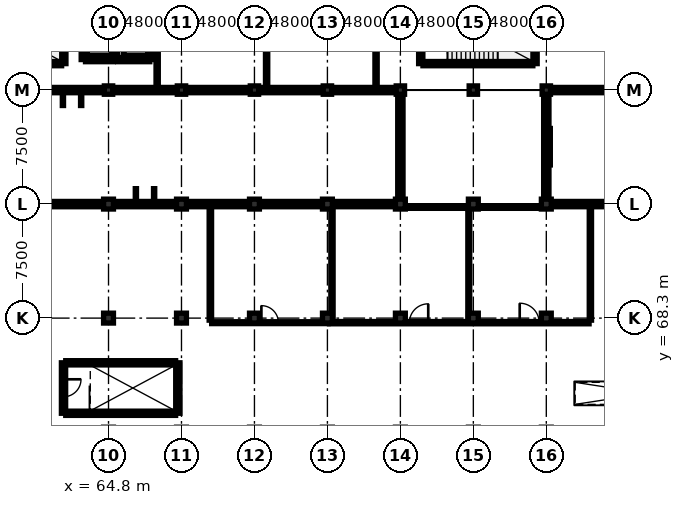
"""IFC4 building model, lengths in metres.
Left out: names, types, materials, properties, quantities, classifications, styles, units other than length and angle.
Written with IfcOpenShell. Run it as: python <this file> out.ifc"""

import sys

from ifc_helpers import new_model, si_unit, direction, frame, frame_2d, origin, origin_2d, place, context, subcontext, project, spatial, rectangle, circle, extrude, element, fill, save


model = new_model("IFC4")
c1 = context("Model", 3, precision=1e-05, world=origin(), true_north=direction((0.0, 1.0)))
c2 = subcontext(c1, "Body", "Model", "MODEL_VIEW")
j1 = project(units=[si_unit("LENGTHUNIT", "METRE"), si_unit("PLANEANGLEUNIT", "RADIAN")], contexts=[c1])
p1 = place(None, origin())
s1 = spatial("IfcSite", under=j1, at=p1, CompositionType="ELEMENT")
p2 = place(p1, origin())
s2 = spatial("IfcBuilding", under=s1, at=p2, CompositionType="ELEMENT")
p3 = place(p2, frame((0.0, 0.0, 9.5)))
s3 = spatial("IfcBuildingStorey", under=s2, at=p3, CompositionType="ELEMENT", Elevation=9.5)
for number, where, z_axis, x_axis in (
    (1, (64.8, 83.3, 0.0), (0.0, 0.0, 1.0), (1.0, 0.0, 0.0)),
    (2, (69.6, 83.3, 0.0), (0.0, 0.0, 1.0), (1.0, 0.0, 0.0)),
    (3, (74.4, 83.3, 0.0), (0.0, 0.0, 1.0), (1.0, 0.0, 0.0)),
    (4, (79.2, 83.3, 0.0), (0.0, 0.0, 1.0), (1.0, 0.0, 0.0)),
):
    element("IfcColumn", number, at=place(p3, frame(where, z_axis=z_axis, x_axis=x_axis)), inside=s3, PredefinedType="COLUMN", context=c2, shape_type="SweptSolid", body=[
        extrude(rectangle(XDim=0.55, YDim=0.55, at=origin_2d()), origin(), (0.0, 0.0, 1.0), 3.7),
    ])
p4 = place(p3, frame((84.0, 75.8, 0.0), z_axis=(0.0, 0.0, 1.0), x_axis=(1.0, 0.0, 0.0)))
e5 = element("IfcColumn", 5, at=p4, inside=s3, PredefinedType="COLUMN", context=c2, shape_type="SweptSolid", body=[
    extrude(circle(Radius=0.325, at=origin_2d()), origin(), (0.0, 0.0, 1.0), 8.55),
])
p5 = place(p3, frame((84.0, 83.3, 0.0), z_axis=(0.0, 0.0, 1.0), x_axis=(1.0, 0.0, 0.0)))
e6 = element("IfcColumn", 6, at=p5, inside=s3, PredefinedType="COLUMN", context=c2, shape_type="SweptSolid", body=[
    extrude(rectangle(XDim=0.55, YDim=0.55, at=origin_2d()), origin(), (0.0, 0.0, 1.0), 3.8),
])
p6 = place(p3, frame((88.8, 75.8, 0.0), z_axis=(0.0, 0.0, 1.0), x_axis=(1.0, 0.0, 0.0)))
e7 = element("IfcColumn", 7, at=p6, inside=s3, PredefinedType="COLUMN", context=c2, shape_type="SweptSolid", body=[
    extrude(circle(Radius=0.325, at=origin_2d()), origin(), (0.0, 0.0, 1.0), 8.55),
])
p7 = place(p3, frame((88.8, 83.3, 0.0), z_axis=(0.0, 0.0, 1.0), x_axis=(1.0, 0.0, 0.0)))
e8 = element("IfcColumn", 8, at=p7, inside=s3, PredefinedType="COLUMN", context=c2, shape_type="SweptSolid", body=[
    extrude(rectangle(XDim=0.55, YDim=0.55, at=origin_2d()), origin(), (0.0, 0.0, 1.0), 3.7),
])
p8 = place(p3, frame((93.6, 75.8, 0.0), z_axis=(0.0, 0.0, 1.0), x_axis=(1.0, 0.0, 0.0)))
e9 = element("IfcColumn", 9, at=p8, inside=s3, PredefinedType="COLUMN", context=c2, shape_type="SweptSolid", body=[
    extrude(circle(Radius=0.325, at=origin_2d()), origin(), (0.0, 0.0, 1.0), 8.55),
])
p9 = place(p3, frame((93.6, 83.3, 0.0), z_axis=(0.0, 0.0, 1.0), x_axis=(1.0, 0.0, 0.0)))
e10 = element("IfcColumn", 10, at=p9, inside=s3, PredefinedType="COLUMN", context=c2, shape_type="SweptSolid", body=[
    extrude(rectangle(XDim=0.55, YDim=0.55, at=origin_2d()), origin(), (0.0, 0.0, 1.0), 3.8),
])
p10 = place(p3, frame((64.8, 68.3, 0.0), z_axis=(0.0, 0.0, 1.0), x_axis=(1.0, 0.0, 0.0)))
e11 = element("IfcColumn", 11, at=p10, inside=s3, PredefinedType="COLUMN", context=c2, shape_type="SweptSolid", body=[
    extrude(circle(Radius=0.325, at=origin_2d()), origin(), (0.0, 0.0, 1.0), 6.0),
])
p11 = place(p3, frame((64.8, 75.8, 0.0), z_axis=(0.0, 0.0, 1.0), x_axis=(1.0, 0.0, 0.0)))
e12 = element("IfcColumn", 12, at=p11, inside=s3, PredefinedType="COLUMN", context=c2, shape_type="SweptSolid", body=[
    extrude(circle(Radius=0.325, at=origin_2d()), origin(), (0.0, 0.0, 1.0), 8.55),
])
p12 = place(p3, frame((69.6, 68.3, 0.0), z_axis=(0.0, 0.0, 1.0), x_axis=(1.0, 0.0, 0.0)))
e13 = element("IfcColumn", 13, at=p12, inside=s3, PredefinedType="COLUMN", context=c2, shape_type="SweptSolid", body=[
    extrude(circle(Radius=0.325, at=origin_2d()), origin(), (0.0, 0.0, 1.0), 6.0),
])
p13 = place(p3, frame((69.6, 75.8, 0.0), z_axis=(0.0, 0.0, 1.0), x_axis=(1.0, 0.0, 0.0)))
e14 = element("IfcColumn", 14, at=p13, inside=s3, PredefinedType="COLUMN", context=c2, shape_type="SweptSolid", body=[
    extrude(circle(Radius=0.325, at=origin_2d()), origin(), (0.0, 0.0, 1.0), 8.55),
])
p14 = place(p3, frame((74.4, 68.3, 0.0), z_axis=(0.0, 0.0, 1.0), x_axis=(1.0, 0.0, 0.0)))
e15 = element("IfcColumn", 15, at=p14, inside=s3, PredefinedType="COLUMN", context=c2, shape_type="SweptSolid", body=[
    extrude(circle(Radius=0.325, at=origin_2d()), origin(), (0.0, 0.0, 1.0), 6.0),
])
p15 = place(p3, frame((74.4, 75.8, 0.0), z_axis=(0.0, 0.0, 1.0), x_axis=(1.0, 0.0, 0.0)))
e16 = element("IfcColumn", 16, at=p15, inside=s3, PredefinedType="COLUMN", context=c2, shape_type="SweptSolid", body=[
    extrude(circle(Radius=0.325, at=origin_2d()), origin(), (0.0, 0.0, 1.0), 8.55),
])
p16 = place(p3, frame((79.2, 68.3, 0.0), z_axis=(0.0, 0.0, 1.0), x_axis=(1.0, 0.0, 0.0)))
e17 = element("IfcColumn", 17, at=p16, inside=s3, PredefinedType="COLUMN", context=c2, shape_type="SweptSolid", body=[
    extrude(circle(Radius=0.325, at=origin_2d()), origin(), (0.0, 0.0, 1.0), 6.0),
])
p17 = place(p3, frame((79.2, 75.8, 0.0), z_axis=(0.0, 0.0, 1.0), x_axis=(1.0, 0.0, 0.0)))
e18 = element("IfcColumn", 18, at=p17, inside=s3, PredefinedType="COLUMN", context=c2, shape_type="SweptSolid", body=[
    extrude(circle(Radius=0.325, at=origin_2d()), origin(), (0.0, 0.0, 1.0), 8.55),
])
for number, where, z_axis, x_axis in (
    (19, (84.0, 68.3, 0.0), (0.0, 0.0, 1.0), (1.0, 0.0, 0.0)),
    (20, (88.8, 68.3, 0.0), (0.0, 0.0, 1.0), (1.0, 0.0, 0.0)),
    (21, (93.6, 68.3, 0.0), (0.0, 0.0, 1.0), (1.0, 0.0, 0.0)),
):
    element("IfcColumn", number, at=place(p3, frame(where, z_axis=z_axis, x_axis=x_axis)), inside=s3, PredefinedType="COLUMN", context=c2, shape_type="SweptSolid", body=[
        extrude(circle(Radius=0.325, at=origin_2d()), origin(), (0.0, 0.0, 1.0), 6.0),
    ])
for number, where, z_axis, x_axis in (
    (22, (83.725, 83.3, 0.0), (0.0, 0.0, 1.0), (-1.0, 0.0, 0.0)),
    (23, (78.925, 83.3, 0.0), (0.0, 0.0, 1.0), (-1.0, 0.0, 0.0)),
    (24, (74.125, 83.3, 0.0), (0.0, 0.0, 1.0), (-1.0, 0.0, 0.0)),
    (25, (69.325, 83.3, 0.0), (0.0, 0.0, 1.0), (-1.0, 0.0, 0.0)),
):
    element("IfcWall", number, at=place(p3, frame(where, z_axis=z_axis, x_axis=x_axis)), inside=s3, PredefinedType="SOLIDWALL", context=c2, shape_type="SweptSolid", body=[
        extrude(rectangle(XDim=4.25, YDim=0.35, at=frame_2d((2.125, 0.0))), origin(), (0.0, 0.0, 1.0), 2.985),
    ])
for number, where, z_axis, x_axis in (
    (26, (64.525, 83.3, 0.0), (0.0, 0.0, 1.0), (-1.0, 0.0, 0.0)),
    (27, (98.125, 83.3, 0.0), (0.0, 0.0, 1.0), (-1.0, 0.0, 0.0)),
):
    element("IfcWall", number, at=place(p3, frame(where, z_axis=z_axis, x_axis=x_axis)), inside=s3, PredefinedType="SOLIDWALL", context=c2, shape_type="SweptSolid", body=[
        extrude(rectangle(XDim=4.25, YDim=0.35, at=frame_2d((2.125, 0.0))), origin(), (0.0, 0.0, 1.0), 3.035),
    ])
p18 = place(p3, frame((93.6, 83.025, 0.0), z_axis=(0.0, 0.0, 1.0), x_axis=(0.0, -1.0, 0.0)))
e28 = element("IfcWall", 28, at=p18, inside=s3, PredefinedType="SOLIDWALL", context=c2, shape_type="SweptSolid", body=[
    extrude(rectangle(XDim=6.9, YDim=0.35, at=frame_2d((3.45, 0.0))), origin(), (0.0, 0.0, 1.0), 3.035),
])
p19 = place(p3, frame((93.925, 75.8, 0.0), z_axis=(0.0, 0.0, 1.0), x_axis=(1.0, 0.0, 0.0)))
e29 = element("IfcWall", 29, at=p19, inside=s3, PredefinedType="SOLIDWALL", context=c2, shape_type="SweptSolid", body=[
    extrude(rectangle(XDim=4.15, YDim=0.35, at=frame_2d((2.075, 0.0))), origin(), (0.0, 0.0, 1.0), 3.425),
])
p20 = place(p3, frame((60.325, 75.8, 0.0), z_axis=(0.0, 0.0, 1.0), x_axis=(1.0, 0.0, 0.0)))
e30 = element("IfcWall", 30, at=p20, inside=s3, PredefinedType="SOLIDWALL", context=c2, shape_type="SweptSolid", body=[
    extrude(rectangle(XDim=4.15, YDim=0.35, at=frame_2d((2.075, 0.0))), origin(), (0.0, 0.0, 1.0), 3.7),
])
p21 = place(p20, frame((1.375, 0.0, 0.9)))
e31 = element("IfcOpeningElement", 31, at=p21, cuts=e30, PredefinedType="OPENING", context=c2, shape_type="SweptSolid", body=[
    extrude(rectangle(XDim=1.4, YDim=1.3, at=frame_2d((0.7, 0.65))), frame((0.0, 0.187, 0.0), z_axis=(0.0, -1.0, 0.0), x_axis=(1.0, 0.0, 0.0)), (0.0, 0.0, 1.0), 0.374),
])
p22 = place(p3, frame((65.125, 75.8, 0.0), z_axis=(0.0, 0.0, 1.0), x_axis=(1.0, 0.0, 0.0)))
e32 = element("IfcWall", 32, at=p22, inside=s3, PredefinedType="SOLIDWALL", context=c2, shape_type="SweptSolid", body=[
    extrude(rectangle(XDim=4.15, YDim=0.35, at=frame_2d((2.075, 0.0))), origin(), (0.0, 0.0, 1.0), 3.7),
])
p23 = place(p22, frame((1.375, 0.0, 0.9)))
e33 = element("IfcOpeningElement", 33, at=p23, cuts=e32, PredefinedType="OPENING", context=c2, shape_type="SweptSolid", body=[
    extrude(rectangle(XDim=1.4, YDim=1.5, at=frame_2d((0.7, 0.75))), frame((0.0, 0.187, 0.0), z_axis=(0.0, -1.0, 0.0), x_axis=(1.0, 0.0, 0.0)), (0.0, 0.0, 1.0), 0.374),
])
p24 = place(p3, frame((69.925, 75.8, 0.0), z_axis=(0.0, 0.0, 1.0), x_axis=(1.0, 0.0, 0.0)))
e34 = element("IfcWall", 34, at=p24, inside=s3, PredefinedType="SOLIDWALL", context=c2, shape_type="SweptSolid", body=[
    extrude(rectangle(XDim=4.15, YDim=0.35, at=frame_2d((2.075, 0.0))), origin(), (0.0, 0.0, 1.0), 3.7),
])
p25 = place(p3, frame((74.725, 75.8, 0.0), z_axis=(0.0, 0.0, 1.0), x_axis=(1.0, 0.0, 0.0)))
e35 = element("IfcWall", 35, at=p25, inside=s3, PredefinedType="SOLIDWALL", context=c2, shape_type="SweptSolid", body=[
    extrude(rectangle(XDim=4.15, YDim=0.35, at=frame_2d((2.075, 0.0))), origin(), (0.0, 0.0, 1.0), 3.7),
])
p26 = place(p25, frame((1.375, 0.0, 0.9)))
e36 = element("IfcOpeningElement", 36, at=p26, cuts=e35, PredefinedType="OPENING", context=c2, shape_type="SweptSolid", body=[
    extrude(rectangle(XDim=1.4, YDim=1.7, at=frame_2d((0.7, 0.85))), frame((0.0, 0.187, 0.0), z_axis=(0.0, -1.0, 0.0), x_axis=(1.0, 0.0, 0.0)), (0.0, 0.0, 1.0), 0.374),
])
p27 = place(p3, frame((79.525, 75.8, 0.0), z_axis=(0.0, 0.0, 1.0), x_axis=(1.0, 0.0, 0.0)))
e37 = element("IfcWall", 37, at=p27, inside=s3, PredefinedType="SOLIDWALL", context=c2, shape_type="SweptSolid", body=[
    extrude(rectangle(XDim=4.15, YDim=0.35, at=frame_2d((2.075, 0.0))), origin(), (0.0, 0.0, 1.0), 3.425),
])
p28 = place(p3, frame((84.0, 76.125, 0.0), z_axis=(0.0, 0.0, 1.0), x_axis=(0.0, 1.0, 0.0)))
e38 = element("IfcWall", 38, at=p28, inside=s3, PredefinedType="SOLIDWALL", context=c2, shape_type="SweptSolid", body=[
    extrude(rectangle(XDim=6.9, YDim=0.35, at=frame_2d((3.45, 0.0))), origin(), (0.0, 0.0, 1.0), 3.035),
])
p29 = place(p3, frame((54.485, 85.04, 0.0), z_axis=(0.0, 0.0, 1.0), x_axis=(1.0, 0.0, 0.0)))
e39 = element("IfcWall", 39, at=p29, inside=s3, PredefinedType="SHEAR", context=c2, shape_type="SweptSolid", body=[
    extrude(rectangle(XDim=7.23, YDim=0.28, at=frame_2d((3.615, 0.0))), origin(), (0.0, 0.0, 1.0), 3.7),
])
p30 = place(p3, frame((61.86, 85.04, 0.0), z_axis=(0.0, 0.0, 1.0), x_axis=(0.0, 1.0, 0.0)))
e40 = element("IfcWall", 40, at=p30, inside=s3, PredefinedType="SHEAR", context=c2, shape_type="SweptSolid", body=[
    extrude(rectangle(XDim=3.32, YDim=0.28, at=frame_2d((1.66, 0.0))), origin(), (0.0, 0.0, 1.0), 3.7),
])
p31 = place(p3, frame((63.286, 85.307, 0.0), z_axis=(0.0, 0.0, 1.0), x_axis=(1.0, 0.0, 0.0)))
e41 = element("IfcWall", 41, at=p31, inside=s3, PredefinedType="SHEAR", context=c2, shape_type="SweptSolid", body=[
    extrude(rectangle(XDim=1.828, YDim=0.28, at=frame_2d((0.914, 0.0))), origin(), (0.0, 0.0, 1.0), 3.7),
])
for number, where, z_axis, x_axis in (
    (42, (65.259, 85.307, 0.0), (0.0, 0.0, 1.0), (0.0, 1.0, 0.0)),
    (43, (63.141, 88.093, 0.0), (0.0, 0.0, 1.0), (0.0, -1.0, 0.0)),
):
    element("IfcWall", number, at=place(p3, frame(where, z_axis=z_axis, x_axis=x_axis)), inside=s3, PredefinedType="SHEAR", context=c2, shape_type="SweptSolid", body=[
        extrude(rectangle(XDim=2.787, YDim=0.28, at=frame_2d((1.393, 0.0))), origin(), (0.0, 0.0, 1.0), 3.7),
    ])
p32 = place(p3, frame((65.404, 85.307, 0.0), z_axis=(0.0, 0.0, 1.0), x_axis=(1.0, 0.0, 0.0)))
e44 = element("IfcWall", 44, at=p32, inside=s3, PredefinedType="SHEAR", context=c2, shape_type="SweptSolid", body=[
    extrude(rectangle(XDim=2.11, YDim=0.28, at=frame_2d((1.055, 0.0))), origin(), (0.0, 0.0, 1.0), 3.7),
])
p33 = place(p3, frame((67.659, 85.307, 0.0), z_axis=(0.0, 0.0, 1.0), x_axis=(0.0, 1.0, 0.0)))
e45 = element("IfcWall", 45, at=p33, inside=s3, PredefinedType="SHEAR", context=c2, shape_type="SweptSolid", body=[
    extrude(rectangle(XDim=2.787, YDim=0.28, at=frame_2d((1.393, 0.0))), origin(), (0.0, 0.0, 1.0), 3.7),
])
p34 = place(p3, frame((85.485, 85.04, 0.0), z_axis=(0.0, 0.0, 1.0), x_axis=(1.0, 0.0, 0.0)))
e46 = element("IfcWall", 46, at=p34, inside=s3, PredefinedType="SHEAR", context=c2, shape_type="SweptSolid", body=[
    extrude(rectangle(XDim=7.23, YDim=0.28, at=frame_2d((3.615, 0.0))), origin(), (0.0, 0.0, 1.0), 3.7),
])
p35 = place(p3, frame((92.86, 85.04, 0.0), z_axis=(0.0, 0.0, 1.0), x_axis=(0.0, 1.0, 0.0)))
e47 = element("IfcWall", 47, at=p35, inside=s3, PredefinedType="SHEAR", context=c2, shape_type="SweptSolid", body=[
    extrude(rectangle(XDim=3.32, YDim=0.28, at=frame_2d((1.66, 0.0))), origin(), (0.0, 0.0, 1.0), 3.7),
])
p36 = place(p3, frame((85.34, 88.36, 0.0), z_axis=(0.0, 0.0, 1.0), x_axis=(0.0, -1.0, 0.0)))
e48 = element("IfcWall", 48, at=p36, inside=s3, PredefinedType="SHEAR", context=c2, shape_type="SweptSolid", body=[
    extrude(rectangle(XDim=3.32, YDim=0.28, at=frame_2d((1.66, 0.0))), origin(), (0.0, 0.0, 1.0), 3.7),
])
p37 = place(p36, frame((1.085, 0.0, 0.0)))
e49 = element("IfcOpeningElement", 49, at=p37, cuts=e48, PredefinedType="OPENING", context=c2, shape_type="SweptSolid", body=[
    extrude(rectangle(XDim=1.15, YDim=2.15, at=frame_2d((0.575, 1.075))), frame((0.0, 0.152, 0.0), z_axis=(0.0, -1.0, 0.0), x_axis=(1.0, 0.0, 0.0)), (0.0, 0.0, 1.0), 0.304),
])
p38 = place(p3, frame((61.985, 62.04, 0.0), z_axis=(0.0, 0.0, 1.0), x_axis=(1.0, 0.0, 0.0)))
e50 = element("IfcWall", 50, at=p38, inside=s3, PredefinedType="SHEAR", context=c2, shape_type="SweptSolid", body=[
    extrude(rectangle(XDim=7.23, YDim=0.28, at=frame_2d((3.615, 0.0))), origin(), (0.0, 0.0, 1.0), 3.7),
])
p39 = place(p3, frame((69.36, 62.04, 0.0), z_axis=(0.0, 0.0, 1.0), x_axis=(0.0, 1.0, 0.0)))
e51 = element("IfcWall", 51, at=p39, inside=s3, PredefinedType="SHEAR", context=c2, shape_type="SweptSolid", body=[
    extrude(rectangle(XDim=3.32, YDim=0.28, at=frame_2d((1.66, 0.0))), origin(), (0.0, 0.0, 1.0), 3.7),
])
p40 = place(p3, frame((69.215, 65.36, 0.0), z_axis=(0.0, 0.0, 1.0), x_axis=(-1.0, 0.0, 0.0)))
e52 = element("IfcWall", 52, at=p40, inside=s3, PredefinedType="SHEAR", context=c2, shape_type="SweptSolid", body=[
    extrude(rectangle(XDim=7.23, YDim=0.28, at=frame_2d((3.615, 0.0))), origin(), (0.0, 0.0, 1.0), 3.7),
])
p41 = place(p3, frame((61.84, 65.36, 0.0), z_axis=(0.0, 0.0, 1.0), x_axis=(0.0, -1.0, 0.0)))
e53 = element("IfcWall", 53, at=p41, inside=s3, PredefinedType="SHEAR", context=c2, shape_type="SweptSolid", body=[
    extrude(rectangle(XDim=3.32, YDim=0.28, at=frame_2d((1.66, 0.0))), origin(), (0.0, 0.0, 1.0), 3.7),
])
p42 = place(p41, frame((1.085, 0.0, 0.0)))
e54 = element("IfcOpeningElement", 54, at=p42, cuts=e53, PredefinedType="OPENING", context=c2, shape_type="SweptSolid", body=[
    extrude(rectangle(XDim=1.15, YDim=2.15, at=frame_2d((0.575, 1.075))), frame((0.0, 0.152, 0.0), z_axis=(0.0, -1.0, 0.0), x_axis=(1.0, 0.0, 0.0)), (0.0, 0.0, 1.0), 0.304),
])
p43 = place(p3, frame((71.585, 68.0, 0.0), z_axis=(0.0, 0.0, 1.0), x_axis=(1.0, 0.0, 0.0)))
e55 = element("IfcWall", 55, at=p43, inside=s3, PredefinedType="PARTITIONING", context=c2, shape_type="SweptSolid", body=[
    extrude(rectangle(XDim=7.663, YDim=0.125, at=frame_2d((3.832, 0.0))), origin(), (0.0, 0.0, 1.0), 3.7),
])
p44 = place(p43, frame((3.271, 0.0, 0.0)))
e56 = element("IfcOpeningElement", 56, at=p44, cuts=e55, PredefinedType="OPENING", context=c2, shape_type="SweptSolid", body=[
    extrude(rectangle(XDim=1.12, YDim=2.2, at=frame_2d((0.56, 1.1))), frame((0.0, 0.074, 0.0), z_axis=(0.0, -1.0, 0.0), x_axis=(1.0, 0.0, 0.0)), (0.0, 0.0, 1.0), 0.149),
])
p45 = place(p3, frame((79.337, 68.0, 0.0), z_axis=(0.0, 0.0, 1.0), x_axis=(1.0, 0.0, 0.0)))
e57 = element("IfcWall", 57, at=p45, inside=s3, PredefinedType="PARTITIONING", context=c2, shape_type="SweptSolid", body=[
    extrude(rectangle(XDim=9.326, YDim=0.15, at=frame_2d((4.663, 0.0))), origin(), (0.0, 0.0, 1.0), 3.7),
])
p46 = place(p45, frame((5.256, 0.0, 0.0)))
e58 = element("IfcOpeningElement", 58, at=p46, cuts=e57, PredefinedType="OPENING", context=c2, shape_type="SweptSolid", body=[
    extrude(rectangle(XDim=1.24, YDim=2.2, at=frame_2d((0.62, 1.1))), frame((0.0, 0.087, 0.0), z_axis=(0.0, -1.0, 0.0), x_axis=(1.0, 0.0, 0.0)), (0.0, 0.0, 1.0), 0.174),
])
p47 = place(p3, frame((88.937, 68.0, 0.0), z_axis=(0.0, 0.0, 1.0), x_axis=(1.0, 0.0, 0.0)))
e59 = element("IfcWall", 59, at=p47, inside=s3, PredefinedType="PARTITIONING", context=c2, shape_type="SweptSolid", body=[
    extrude(rectangle(XDim=7.478, YDim=0.15, at=frame_2d((3.739, 0.0))), origin(), (0.0, 0.0, 1.0), 3.7),
])
p48 = place(p47, frame((2.913, 0.0, 0.0)))
e60 = element("IfcOpeningElement", 60, at=p48, cuts=e59, PredefinedType="OPENING", context=c2, shape_type="SweptSolid", body=[
    extrude(rectangle(XDim=1.28, YDim=2.22, at=frame_2d((0.64, 1.11))), frame((0.0, 0.087, 0.0), z_axis=(0.0, -1.0, 0.0), x_axis=(1.0, 0.0, 0.0)), (0.0, 0.0, 1.0), 0.174),
])
p49 = place(p3, frame((84.06, 75.6, 0.0), z_axis=(0.0, 0.0, 1.0), x_axis=(1.0, 0.0, 0.0)))
e61 = element("IfcWall", 61, at=p49, inside=s3, PredefinedType="PARTITIONING", context=c2, shape_type="SweptSolid", body=[
    extrude(rectangle(XDim=4.472, YDim=0.16, at=frame_2d((2.236, 0.0))), origin(), (0.0, 0.0, 1.0), 3.425),
])
p50 = place(p3, frame((89.024, 75.6, 0.0), z_axis=(0.0, 0.0, 1.0), x_axis=(1.0, 0.0, 0.0)))
e62 = element("IfcWall", 62, at=p50, inside=s3, PredefinedType="PARTITIONING", context=c2, shape_type="SweptSolid", body=[
    extrude(rectangle(XDim=4.516, YDim=0.16, at=frame_2d((2.258, 0.0))), origin(), (0.0, 0.0, 1.0), 3.425),
])
p51 = place(p3, frame((71.5, 68.165, 0.0), z_axis=(0.0, 0.0, 1.0), x_axis=(0.0, 1.0, 0.0)))
e63 = element("IfcWall", 63, at=p51, inside=s3, PredefinedType="PARTITIONING", context=c2, shape_type="SweptSolid", body=[
    extrude(rectangle(XDim=7.448, YDim=0.16, at=frame_2d((3.724, 0.0))), origin(), (0.0, 0.0, 1.0), 3.7),
])
p52 = place(p3, frame((79.5, 68.332, 0.0), z_axis=(0.0, 0.0, 1.0), x_axis=(0.0, 1.0, 0.0)))
e64 = element("IfcWall", 64, at=p52, inside=s3, PredefinedType="PARTITIONING", context=c2, shape_type="SweptSolid", body=[
    extrude(rectangle(XDim=7.331, YDim=0.15, at=frame_2d((3.666, 0.0))), origin(), (0.0, 0.0, 1.0), 3.7),
])
p53 = place(p3, frame((88.5, 68.332, 0.0), z_axis=(0.0, 0.0, 1.0), x_axis=(0.0, 1.0, 0.0)))
e65 = element("IfcWall", 65, at=p53, inside=s3, PredefinedType="PARTITIONING", context=c2, shape_type="SweptSolid", body=[
    extrude(rectangle(XDim=7.176, YDim=0.125, at=frame_2d((3.588, 0.0))), origin(), (0.0, 0.0, 1.0), 3.7),
])
p54 = place(p3, frame((96.5, 68.165, 0.0), z_axis=(0.0, 0.0, 1.0), x_axis=(0.0, 1.0, 0.0)))
e66 = element("IfcWall", 66, at=p54, inside=s3, PredefinedType="PARTITIONING", context=c2, shape_type="SweptSolid", body=[
    extrude(rectangle(XDim=7.448, YDim=0.15, at=frame_2d((3.724, 0.0))), origin(), (0.0, 0.0, 1.0), 3.7),
])
p55 = place(p3, frame((68.0, 83.487, 0.0), z_axis=(0.0, 0.0, 1.0), x_axis=(0.0, 1.0, 0.0)))
e67 = element("IfcWall", 67, at=p55, inside=s3, PredefinedType="PARTITIONING", context=c2, shape_type="SweptSolid", body=[
    extrude(rectangle(XDim=9.548, YDim=0.15, at=frame_2d((4.774, 0.0))), origin(), (0.0, 0.0, 1.0), 3.035),
])
p56 = place(p3, frame((75.2, 83.487, 0.0), z_axis=(0.0, 0.0, 1.0), x_axis=(0.0, 1.0, 0.0)))
e68 = element("IfcWall", 68, at=p56, inside=s3, PredefinedType="PARTITIONING", context=c2, shape_type="SweptSolid", body=[
    extrude(rectangle(XDim=9.621, YDim=0.15, at=frame_2d((4.811, 0.0))), origin(), (0.0, 0.0, 1.0), 3.035),
])
p57 = place(p3, frame((82.4, 83.487, 0.0), z_axis=(0.0, 0.0, 1.0), x_axis=(0.0, 1.0, 0.0)))
e69 = element("IfcWall", 69, at=p57, inside=s3, PredefinedType="PARTITIONING", context=c2, shape_type="SweptSolid", body=[
    extrude(rectangle(XDim=9.548, YDim=0.15, at=frame_2d((4.774, 0.0))), origin(), (0.0, 0.0, 1.0), 3.035),
])
p58 = place(p21, origin())
e70 = element("IfcWindow", 70, at=p58, inside=s3, PartitioningType="SINGLE_PANEL", PredefinedType="WINDOW", context=c2, shape_type="SweptSolid", body=[
    extrude(rectangle(XDim=1.4, YDim=1.3, at=frame_2d((0.7, 0.65))), frame((0.0, 0.03, 0.0), z_axis=(0.0, -1.0, 0.0), x_axis=(1.0, 0.0, 0.0)), (0.0, 0.0, 1.0), 0.06),
])
fill(e31, e70)
p59 = place(p23, origin())
e71 = element("IfcWindow", 71, at=p59, inside=s3, PartitioningType="SINGLE_PANEL", PredefinedType="WINDOW", context=c2, shape_type="SweptSolid", body=[
    extrude(rectangle(XDim=1.4, YDim=1.5, at=frame_2d((0.7, 0.75))), frame((0.0, 0.03, 0.0), z_axis=(0.0, -1.0, 0.0), x_axis=(1.0, 0.0, 0.0)), (0.0, 0.0, 1.0), 0.06),
])
fill(e33, e71)
p60 = place(p26, origin())
e72 = element("IfcWindow", 72, at=p60, inside=s3, PartitioningType="SINGLE_PANEL", PredefinedType="WINDOW", context=c2, shape_type="SweptSolid", body=[
    extrude(rectangle(XDim=1.4, YDim=1.7, at=frame_2d((0.7, 0.85))), frame((0.0, 0.03, 0.0), z_axis=(0.0, -1.0, 0.0), x_axis=(1.0, 0.0, 0.0)), (0.0, 0.0, 1.0), 0.06),
])
fill(e36, e72)
p61 = place(p42, origin())
e73 = element("IfcDoor", 73, at=p61, inside=s3, OperationType="SINGLE_SWING_LEFT", PredefinedType="DOOR", context=c2, shape_type="SweptSolid", body=[
    extrude(rectangle(XDim=1.15, YDim=2.15, at=frame_2d((0.575, 1.075))), frame((0.0, 0.025, 0.0), z_axis=(0.0, -1.0, 0.0), x_axis=(1.0, 0.0, 0.0)), (0.0, 0.0, 1.0), 0.05),
])
fill(e54, e73)
p62 = place(p44, origin())
e74 = element("IfcDoor", 74, at=p62, inside=s3, OperationType="SINGLE_SWING_LEFT", PredefinedType="DOOR", context=c2, shape_type="SweptSolid", body=[
    extrude(rectangle(XDim=1.12, YDim=2.2, at=frame_2d((0.56, 1.1))), frame((0.0, 0.025, 0.0), z_axis=(0.0, -1.0, 0.0), x_axis=(1.0, 0.0, 0.0)), (0.0, 0.0, 1.0), 0.05),
])
fill(e56, e74)
p63 = place(p46, origin())
e75 = element("IfcDoor", 75, at=p63, inside=s3, OperationType="SINGLE_SWING_RIGHT", PredefinedType="DOOR", context=c2, shape_type="SweptSolid", body=[
    extrude(rectangle(XDim=1.24, YDim=2.2, at=frame_2d((0.62, 1.1))), frame((0.0, 0.025, 0.0), z_axis=(0.0, -1.0, 0.0), x_axis=(1.0, 0.0, 0.0)), (0.0, 0.0, 1.0), 0.05),
])
fill(e58, e75)
p64 = place(p48, origin())
e76 = element("IfcDoor", 76, at=p64, inside=s3, OperationType="SINGLE_SWING_LEFT", PredefinedType="DOOR", context=c2, shape_type="SweptSolid", body=[
    extrude(rectangle(XDim=1.28, YDim=2.22, at=frame_2d((0.64, 1.11))), frame((0.0, 0.025, 0.0), z_axis=(0.0, -1.0, 0.0), x_axis=(1.0, 0.0, 0.0)), (0.0, 0.0, 1.0), 0.05),
])
fill(e60, e76)
save(model, sys.argv[1])
